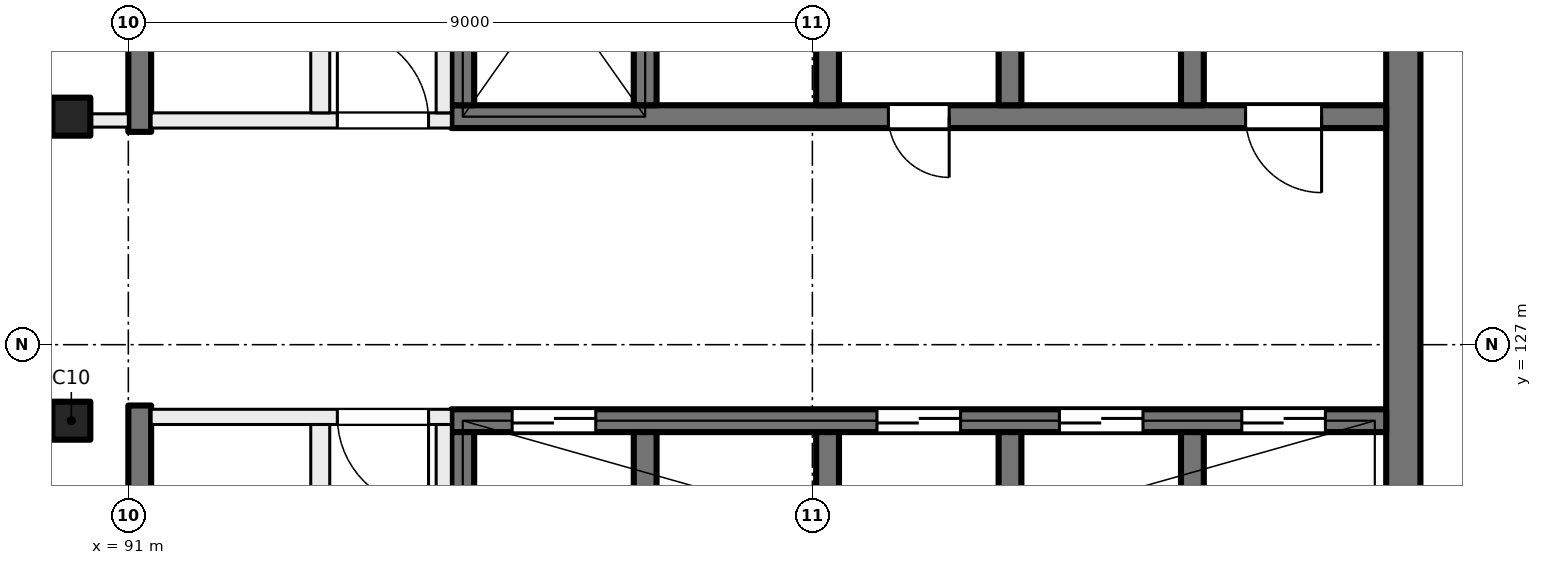
"""IFC4 building model, lengths in metres.
Left out: names, types, materials, properties, quantities, classifications, styles, units other than length and angle.
Written with IfcOpenShell. Run it as: python <this file> out.ifc"""

import sys

from ifc_helpers import new_model, si_unit, direction, frame, frame_2d, origin, origin_2d, place, context, subcontext, project, spatial, rectangle, extrude, element, fill, save


model = new_model("IFC4")
c1 = context("Model", 3, precision=1e-05, world=origin(), true_north=direction((0.0, 1.0)))
c2 = subcontext(c1, "Body", "Model", "MODEL_VIEW")
j1 = project(units=[si_unit("LENGTHUNIT", "METRE"), si_unit("PLANEANGLEUNIT", "RADIAN")], contexts=[c1])
p1 = place(None, origin())
s1 = spatial("IfcSite", under=j1, at=p1, CompositionType="ELEMENT")
p2 = place(p1, origin())
s2 = spatial("IfcBuilding", under=s1, at=p2, CompositionType="ELEMENT")
p3 = place(p2, frame((0.0, 0.0, 245.5)))
s3 = spatial("IfcBuildingStorey", under=s2, at=p3, CompositionType="ELEMENT", Elevation=245.5)
for number, where, z_axis, x_axis in (
    (1, (90.25, 130.0, 0.0), (0.0, 0.0, 1.0), (1.0, 0.0, 0.0)),
    (2, (90.25, 126.0, 0.0), (0.0, 0.0, 1.0), (1.0, 0.0, 0.0)),
):
    element("IfcColumn", number, at=place(p3, frame(where, z_axis=z_axis, x_axis=x_axis)), inside=s3, PredefinedType="COLUMN", context=c2, shape_type="SweptSolid", body=[
        extrude(rectangle(XDim=0.5, YDim=0.5, at=origin_2d()), origin(), (0.0, 0.0, 1.0), 4.0),
    ])
p4 = place(p3, frame((107.775, 135.2, 0.0), z_axis=(0.0, 0.0, 1.0), x_axis=(0.0, -1.0, 0.0)))
e3 = element("IfcWall", 3, at=p4, inside=s3, PredefinedType="SHEAR", context=c2, shape_type="SweptSolid", body=[
    extrude(rectangle(XDim=14.4, YDim=0.45, at=frame_2d((7.2, 0.0))), origin(), (0.0, 0.0, 1.0), 4.0),
])
p5 = place(p3, frame((107.55, 130.0, 0.0), z_axis=(0.0, 0.0, 1.0), x_axis=(-1.0, 0.0, 0.0)))
e4 = element("IfcWall", 4, at=p5, inside=s3, PredefinedType="SHEAR", context=c2, shape_type="SweptSolid", body=[
    extrude(rectangle(XDim=12.3, YDim=0.3, at=frame_2d((6.15, 0.0))), origin(), (0.0, 0.0, 1.0), 4.0),
])
p6 = place(p5, frame((0.85, 0.0, 0.0)))
e5 = element("IfcOpeningElement", 5, at=p6, cuts=e4, PredefinedType="OPENING", context=c2, shape_type="SweptSolid", body=[
    extrude(rectangle(XDim=1.0, YDim=2.1, at=frame_2d((0.5, 1.05))), frame((0.0, 0.16, 0.0), z_axis=(0.0, -1.0, 0.0), x_axis=(1.0, 0.0, 0.0)), (0.0, 0.0, 1.0), 0.32),
])
p7 = place(p5, frame((5.75, 0.0, 0.0)))
e6 = element("IfcOpeningElement", 6, at=p7, cuts=e4, PredefinedType="OPENING", context=c2, shape_type="SweptSolid", body=[
    extrude(rectangle(XDim=0.8, YDim=2.1, at=frame_2d((0.4, 1.05))), frame((0.0, 0.16, 0.0), z_axis=(0.0, -1.0, 0.0), x_axis=(1.0, 0.0, 0.0)), (0.0, 0.0, 1.0), 0.32),
])
for number, where, z_axis, x_axis in (
    (7, (105.0, 133.25, 0.0), (0.0, 0.0, 1.0), (0.0, -1.0, 0.0)),
    (8, (102.6, 133.25, 0.0), (0.0, 0.0, 1.0), (0.0, -1.0, 0.0)),
    (9, (100.2, 133.25, 0.0), (0.0, 0.0, 1.0), (0.0, -1.0, 0.0)),
    (10, (97.8, 133.25, 0.0), (0.0, 0.0, 1.0), (0.0, -1.0, 0.0)),
    (11, (95.4, 133.25, 0.0), (0.0, 0.0, 1.0), (0.0, -1.0, 0.0)),
):
    element("IfcWall", number, at=place(p3, frame(where, z_axis=z_axis, x_axis=x_axis)), inside=s3, PredefinedType="SHEAR", context=c2, shape_type="SweptSolid", body=[
        extrude(rectangle(XDim=3.1, YDim=0.3, at=frame_2d((1.55, 0.0))), origin(), (0.0, 0.0, 1.0), 4.0),
    ])
p8 = place(p3, frame((107.55, 126.0, 0.0), z_axis=(0.0, 0.0, 1.0), x_axis=(-1.0, 0.0, 0.0)))
e12 = element("IfcWall", 12, at=p8, inside=s3, PredefinedType="SHEAR", context=c2, shape_type="SweptSolid", body=[
    extrude(rectangle(XDim=12.3, YDim=0.3, at=frame_2d((6.15, 0.0))), origin(), (0.0, 0.0, 1.0), 4.0),
])
p9 = place(p8, frame((0.8, 0.0, 0.0)))
e13 = element("IfcOpeningElement", 13, at=p9, cuts=e12, PredefinedType="OPENING", context=c2, shape_type="SweptSolid", body=[
    extrude(rectangle(XDim=1.1, YDim=2.1, at=frame_2d((0.55, 1.05))), frame((0.0, 0.16, 0.0), z_axis=(0.0, -1.0, 0.0), x_axis=(1.0, 0.0, 0.0)), (0.0, 0.0, 1.0), 0.32),
])
p10 = place(p8, frame((3.2, 0.0, 0.0)))
e14 = element("IfcOpeningElement", 14, at=p10, cuts=e12, PredefinedType="OPENING", context=c2, shape_type="SweptSolid", body=[
    extrude(rectangle(XDim=1.1, YDim=2.1, at=frame_2d((0.55, 1.05))), frame((0.0, 0.16, 0.0), z_axis=(0.0, -1.0, 0.0), x_axis=(1.0, 0.0, 0.0)), (0.0, 0.0, 1.0), 0.32),
])
p11 = place(p8, frame((5.6, 0.0, 0.0)))
e15 = element("IfcOpeningElement", 15, at=p11, cuts=e12, PredefinedType="OPENING", context=c2, shape_type="SweptSolid", body=[
    extrude(rectangle(XDim=1.1, YDim=2.1, at=frame_2d((0.55, 1.05))), frame((0.0, 0.16, 0.0), z_axis=(0.0, -1.0, 0.0), x_axis=(1.0, 0.0, 0.0)), (0.0, 0.0, 1.0), 0.32),
])
p12 = place(p8, frame((10.4, 0.0, 0.0)))
e16 = element("IfcOpeningElement", 16, at=p12, cuts=e12, PredefinedType="OPENING", context=c2, shape_type="SweptSolid", body=[
    extrude(rectangle(XDim=1.1, YDim=2.1, at=frame_2d((0.55, 1.05))), frame((0.0, 0.16, 0.0), z_axis=(0.0, -1.0, 0.0), x_axis=(1.0, 0.0, 0.0)), (0.0, 0.0, 1.0), 0.32),
])
for number, where, z_axis, x_axis in (
    (17, (105.0, 125.85, 0.0), (0.0, 0.0, 1.0), (0.0, -1.0, 0.0)),
    (18, (102.6, 125.85, 0.0), (0.0, 0.0, 1.0), (0.0, -1.0, 0.0)),
    (19, (100.2, 125.85, 0.0), (0.0, 0.0, 1.0), (0.0, -1.0, 0.0)),
    (20, (97.8, 125.85, 0.0), (0.0, 0.0, 1.0), (0.0, -1.0, 0.0)),
    (21, (95.4, 125.85, 0.0), (0.0, 0.0, 1.0), (0.0, -1.0, 0.0)),
):
    element("IfcWall", number, at=place(p3, frame(where, z_axis=z_axis, x_axis=x_axis)), inside=s3, PredefinedType="SHEAR", context=c2, shape_type="SweptSolid", body=[
        extrude(rectangle(XDim=3.1, YDim=0.3, at=frame_2d((1.55, 0.0))), origin(), (0.0, 0.0, 1.0), 4.0),
    ])
for number, where, z_axis, x_axis in (
    (22, (91.15, 138.55, 0.0), (0.0, 0.0, 1.0), (0.0, -1.0, 0.0)),
    (23, (91.15, 126.2, 0.0), (0.0, 0.0, 1.0), (0.0, -1.0, 0.0)),
):
    element("IfcWall", number, at=place(p3, frame(where, z_axis=z_axis, x_axis=x_axis)), inside=s3, PredefinedType="SHEAR", context=c2, shape_type="SweptSolid", body=[
        extrude(rectangle(XDim=8.75, YDim=0.3, at=frame_2d((4.375, 0.0))), origin(), (0.0, 0.0, 1.0), 4.0),
    ])
p13 = place(p3, frame((95.25, 126.05, 0.0), z_axis=(0.0, 0.0, 1.0), x_axis=(-1.0, 0.0, 0.0)))
e24 = element("IfcWall", 24, at=p13, inside=s3, PredefinedType="PARTITIONING", context=c2, shape_type="SweptSolid", body=[
    extrude(rectangle(XDim=3.95, YDim=0.2, at=frame_2d((1.975, 0.0))), origin(), (0.0, 0.0, 1.0), 3.625),
])
p14 = place(p13, frame((0.3, 0.0, 0.0)))
e25 = element("IfcOpeningElement", 25, at=p14, cuts=e24, PredefinedType="OPENING", context=c2, shape_type="SweptSolid", body=[
    extrude(rectangle(XDim=1.2, YDim=2.1, at=frame_2d((0.6, 1.05))), frame((0.0, 0.11, 0.0), z_axis=(0.0, -1.0, 0.0), x_axis=(1.0, 0.0, 0.0)), (0.0, 0.0, 1.0), 0.22),
])
p15 = place(p3, frame((95.15, 117.45, 0.0), z_axis=(0.0, 0.0, 1.0), x_axis=(0.0, 1.0, 0.0)))
e26 = element("IfcWall", 26, at=p15, inside=s3, PredefinedType="PARTITIONING", context=c2, shape_type="SweptSolid", body=[
    extrude(rectangle(XDim=8.5, YDim=0.2, at=frame_2d((4.25, 0.0))), origin(), (0.0, 0.0, 1.0), 3.625),
])
p16 = place(p15, frame((1.75, 0.0, 0.0)))
e27 = element("IfcOpeningElement", 27, at=p16, cuts=e26, PredefinedType="OPENING", context=c2, shape_type="SweptSolid", body=[
    extrude(rectangle(XDim=1.5, YDim=2.1, at=frame_2d((0.75, 1.05))), frame((0.0, 0.11, 0.0), z_axis=(0.0, -1.0, 0.0), x_axis=(1.0, 0.0, 0.0)), (0.0, 0.0, 1.0), 0.22),
])
p17 = place(p3, frame((93.525, 117.45, 0.0), z_axis=(0.0, 0.0, 1.0), x_axis=(0.0, 1.0, 0.0)))
e28 = element("IfcWall", 28, at=p17, inside=s3, PredefinedType="PARTITIONING", context=c2, shape_type="SweptSolid", body=[
    extrude(rectangle(XDim=8.5, YDim=0.25, at=frame_2d((4.25, 0.0))), origin(), (0.0, 0.0, 1.0), 3.625),
])
p18 = place(p17, frame((6.71, 0.0, 0.0)))
e29 = element("IfcOpeningElement", 29, at=p18, cuts=e28, PredefinedType="OPENING", context=c2, shape_type="SweptSolid", body=[
    extrude(rectangle(XDim=0.8, YDim=2.1, at=frame_2d((0.4, 1.05))), frame((0.0, 0.135, 0.0), z_axis=(0.0, -1.0, 0.0), x_axis=(1.0, 0.0, 0.0)), (0.0, 0.0, 1.0), 0.27),
])
p19 = place(p17, frame((2.41, 0.0, 0.0)))
e30 = element("IfcOpeningElement", 30, at=p19, cuts=e28, PredefinedType="OPENING", context=c2, shape_type="SweptSolid", body=[
    extrude(rectangle(XDim=0.8, YDim=2.1, at=frame_2d((0.4, 1.05))), frame((0.0, 0.135, 0.0), z_axis=(0.0, -1.0, 0.0), x_axis=(1.0, 0.0, 0.0)), (0.0, 0.0, 1.0), 0.27),
])
p20 = place(p3, frame((91.3, 129.95, 0.0), z_axis=(0.0, 0.0, 1.0), x_axis=(1.0, 0.0, 0.0)))
e31 = element("IfcWall", 31, at=p20, inside=s3, PredefinedType="PARTITIONING", context=c2, shape_type="SweptSolid", body=[
    extrude(rectangle(XDim=3.95, YDim=0.2, at=frame_2d((1.975, 0.0))), origin(), (0.0, 0.0, 1.0), 3.625),
])
p21 = place(p20, frame((2.45, 0.0, 0.0)))
e32 = element("IfcOpeningElement", 32, at=p21, cuts=e31, PredefinedType="OPENING", context=c2, shape_type="SweptSolid", body=[
    extrude(rectangle(XDim=1.2, YDim=2.1, at=frame_2d((0.6, 1.05))), frame((0.0, 0.11, 0.0), z_axis=(0.0, -1.0, 0.0), x_axis=(1.0, 0.0, 0.0)), (0.0, 0.0, 1.0), 0.22),
])
p22 = place(p3, frame((95.15, 130.05, 0.0), z_axis=(0.0, 0.0, 1.0), x_axis=(0.0, 1.0, 0.0)))
e33 = element("IfcWall", 33, at=p22, inside=s3, PredefinedType="PARTITIONING", context=c2, shape_type="SweptSolid", body=[
    extrude(rectangle(XDim=8.5, YDim=0.2, at=frame_2d((4.25, 0.0))), origin(), (0.0, 0.0, 1.0), 3.625),
])
p23 = place(p22, frame((5.25, 0.0, 0.0)))
e34 = element("IfcOpeningElement", 34, at=p23, cuts=e33, PredefinedType="OPENING", context=c2, shape_type="SweptSolid", body=[
    extrude(rectangle(XDim=1.5, YDim=2.1, at=frame_2d((0.75, 1.05))), frame((0.0, 0.11, 0.0), z_axis=(0.0, -1.0, 0.0), x_axis=(1.0, 0.0, 0.0)), (0.0, 0.0, 1.0), 0.22),
])
p24 = place(p3, frame((93.525, 130.05, 0.0), z_axis=(0.0, 0.0, 1.0), x_axis=(0.0, 1.0, 0.0)))
e35 = element("IfcWall", 35, at=p24, inside=s3, PredefinedType="PARTITIONING", context=c2, shape_type="SweptSolid", body=[
    extrude(rectangle(XDim=8.5, YDim=0.25, at=frame_2d((4.25, 0.0))), origin(), (0.0, 0.0, 1.0), 3.625),
])
p25 = place(p24, frame((2.31, 0.0, 0.0)))
e36 = element("IfcOpeningElement", 36, at=p25, cuts=e35, PredefinedType="OPENING", context=c2, shape_type="SweptSolid", body=[
    extrude(rectangle(XDim=1.0, YDim=2.1, at=frame_2d((0.5, 1.05))), frame((0.0, 0.135, 0.0), z_axis=(0.0, -1.0, 0.0), x_axis=(1.0, 0.0, 0.0)), (0.0, 0.0, 1.0), 0.27),
])
p26 = place(p24, frame((6.71, 0.0, 0.0)))
e37 = element("IfcOpeningElement", 37, at=p26, cuts=e35, PredefinedType="OPENING", context=c2, shape_type="SweptSolid", body=[
    extrude(rectangle(XDim=0.8, YDim=2.1, at=frame_2d((0.4, 1.05))), frame((0.0, 0.135, 0.0), z_axis=(0.0, -1.0, 0.0), x_axis=(1.0, 0.0, 0.0)), (0.0, 0.0, 1.0), 0.27),
])
p27 = place(p3, frame((85.838, 129.95, 0.0), z_axis=(0.0, 0.0, 1.0), x_axis=(1.0, 0.0, 0.0)))
e38 = element("IfcWall", 38, at=p27, inside=s3, PredefinedType="PARTITIONING", context=c2, shape_type="SweptSolid", body=[
    extrude(rectangle(XDim=5.162, YDim=0.175, at=frame_2d((2.581, 0.0))), origin(), (0.0, 0.0, 1.0), 3.625),
])
p28 = place(p27, frame((1.971, 0.0, 0.0)))
e39 = element("IfcOpeningElement", 39, at=p28, cuts=e38, PredefinedType="OPENING", context=c2, shape_type="SweptSolid", body=[
    extrude(rectangle(XDim=1.2, YDim=2.1, at=frame_2d((0.6, 1.05))), frame((0.0, 0.097, 0.0), z_axis=(0.0, -1.0, 0.0), x_axis=(1.0, 0.0, 0.0)), (0.0, 0.0, 1.0), 0.195),
])
p29 = place(p9, origin())
e40 = element("IfcDoor", 40, at=p29, inside=s3, OperationType="DOUBLE_DOOR_SLIDING", PredefinedType="DOOR", context=c2, shape_type="SweptSolid", body=[
    extrude(rectangle(XDim=1.1, YDim=2.1, at=frame_2d((0.55, 1.05))), frame((0.0, 0.025, 0.0), z_axis=(0.0, -1.0, 0.0), x_axis=(1.0, 0.0, 0.0)), (0.0, 0.0, 1.0), 0.05),
])
fill(e13, e40)
p30 = place(p10, origin())
e41 = element("IfcDoor", 41, at=p30, inside=s3, OperationType="DOUBLE_DOOR_SLIDING", PredefinedType="DOOR", context=c2, shape_type="SweptSolid", body=[
    extrude(rectangle(XDim=1.1, YDim=2.1, at=frame_2d((0.55, 1.05))), frame((0.0, 0.025, 0.0), z_axis=(0.0, -1.0, 0.0), x_axis=(1.0, 0.0, 0.0)), (0.0, 0.0, 1.0), 0.05),
])
fill(e14, e41)
p31 = place(p11, origin())
e42 = element("IfcDoor", 42, at=p31, inside=s3, OperationType="DOUBLE_DOOR_SLIDING", PredefinedType="DOOR", context=c2, shape_type="SweptSolid", body=[
    extrude(rectangle(XDim=1.1, YDim=2.1, at=frame_2d((0.55, 1.05))), frame((0.0, 0.025, 0.0), z_axis=(0.0, -1.0, 0.0), x_axis=(1.0, 0.0, 0.0)), (0.0, 0.0, 1.0), 0.05),
])
fill(e15, e42)
p32 = place(p12, origin())
e43 = element("IfcDoor", 43, at=p32, inside=s3, OperationType="DOUBLE_DOOR_SLIDING", PredefinedType="DOOR", context=c2, shape_type="SweptSolid", body=[
    extrude(rectangle(XDim=1.1, YDim=2.1, at=frame_2d((0.55, 1.05))), frame((0.0, 0.025, 0.0), z_axis=(0.0, -1.0, 0.0), x_axis=(1.0, 0.0, 0.0)), (0.0, 0.0, 1.0), 0.05),
])
fill(e16, e43)
p33 = place(p6, origin())
e44 = element("IfcDoor", 44, at=p33, inside=s3, OperationType="SINGLE_SWING_LEFT", PredefinedType="DOOR", context=c2, shape_type="SweptSolid", body=[
    extrude(rectangle(XDim=1.0, YDim=2.1, at=frame_2d((0.5, 1.05))), frame((0.0, 0.025, 0.0), z_axis=(0.0, -1.0, 0.0), x_axis=(1.0, 0.0, 0.0)), (0.0, 0.0, 1.0), 0.05),
])
fill(e5, e44)
p34 = place(p7, origin())
e45 = element("IfcDoor", 45, at=p34, inside=s3, OperationType="SINGLE_SWING_RIGHT", PredefinedType="DOOR", context=c2, shape_type="SweptSolid", body=[
    extrude(rectangle(XDim=0.8, YDim=2.1, at=frame_2d((0.4, 1.05))), frame((0.0, 0.025, 0.0), z_axis=(0.0, -1.0, 0.0), x_axis=(1.0, 0.0, 0.0)), (0.0, 0.0, 1.0), 0.05),
])
fill(e6, e45)
p35 = place(p14, origin())
e46 = element("IfcDoor", 46, at=p35, inside=s3, OperationType="DOUBLE_DOOR_SINGLE_SWING", PredefinedType="DOOR", context=c2, shape_type="SweptSolid", body=[
    extrude(rectangle(XDim=1.2, YDim=2.1, at=frame_2d((0.6, 1.05))), frame((0.0, 0.025, 0.0), z_axis=(0.0, -1.0, 0.0), x_axis=(1.0, 0.0, 0.0)), (0.0, 0.0, 1.0), 0.05),
])
fill(e25, e46)
p36 = place(p21, origin())
e47 = element("IfcDoor", 47, at=p36, inside=s3, OperationType="DOUBLE_DOOR_SINGLE_SWING", PredefinedType="DOOR", context=c2, shape_type="SweptSolid", body=[
    extrude(rectangle(XDim=1.2, YDim=2.1, at=frame_2d((0.6, 1.05))), frame((0.0, 0.025, 0.0), z_axis=(0.0, -1.0, 0.0), x_axis=(1.0, 0.0, 0.0)), (0.0, 0.0, 1.0), 0.05),
])
fill(e32, e47)
save(model, sys.argv[1])
